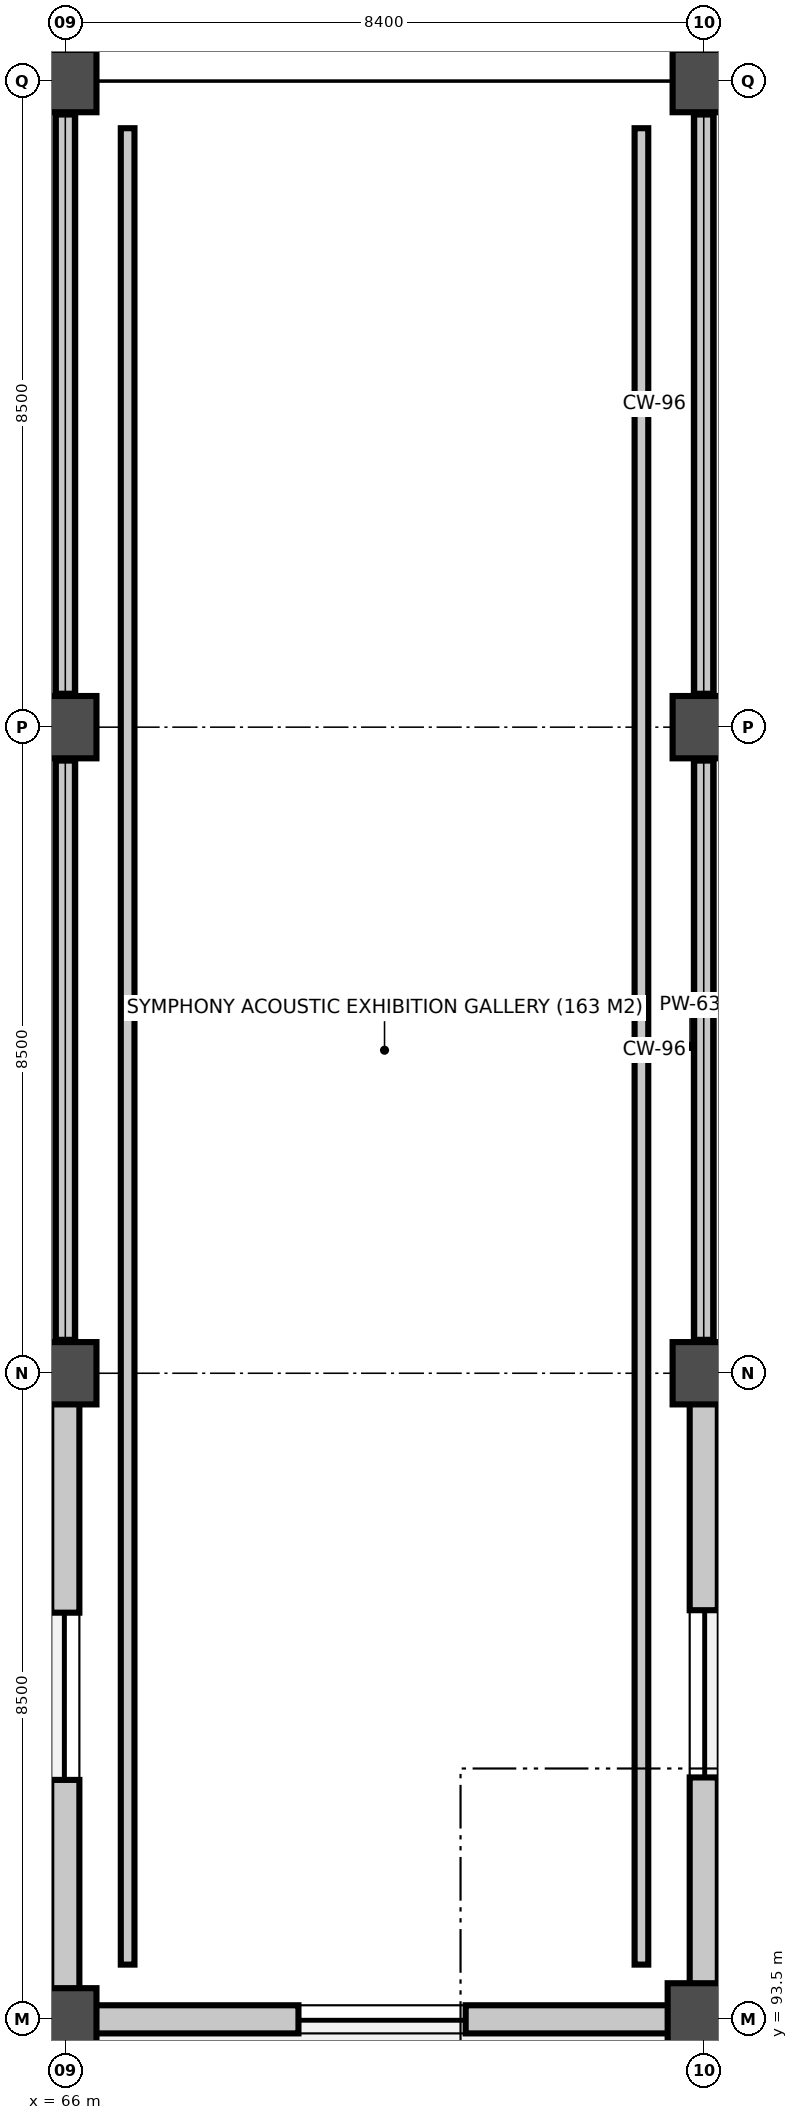
"""IFC4 building model, lengths in metres.
Left out: names, types, materials, properties, quantities, classifications, styles, units other than length and angle.
Written with IfcOpenShell. Run it as: python <this file> out.ifc"""

import sys

from ifc_helpers import new_model, si_unit, direction, frame, frame_2d, origin, origin_2d, place, context, subcontext, project, spatial, rectangle, extrude, element, fill, save


model = new_model("IFC4")
c1 = context("Model", 3, precision=1e-05, world=origin(), true_north=direction((0.0, 1.0)))
c2 = subcontext(c1, "Body", "Model", "MODEL_VIEW")
j1 = project(units=[si_unit("LENGTHUNIT", "METRE"), si_unit("PLANEANGLEUNIT", "RADIAN")], contexts=[c1])
p1 = place(None, origin())
s1 = spatial("IfcSite", under=j1, at=p1, CompositionType="ELEMENT")
p2 = place(p1, origin())
s2 = spatial("IfcBuilding", under=s1, at=p2, CompositionType="ELEMENT")
p3 = place(p2, origin())
s3 = spatial("IfcBuildingStorey", under=s2, at=p3, CompositionType="ELEMENT", Elevation=0.0)
for number, where, z_axis, x_axis in (
    (1, (66.0, 93.5, 0.0), (0.0, 0.0, 1.0), (1.0, 0.0, 0.0)),
    (2, (66.0, 102.0, 0.0), (0.0, 0.0, 1.0), (1.0, 0.0, 0.0)),
    (3, (66.0, 110.5, 0.0), (0.0, 0.0, 1.0), (1.0, 0.0, 0.0)),
    (4, (66.0, 119.0, 0.0), (0.0, 0.0, 1.0), (1.0, 0.0, 0.0)),
):
    element("IfcColumn", number, at=place(p3, frame(where, z_axis=z_axis, x_axis=x_axis)), inside=s3, PredefinedType="COLUMN", context=c2, shape_type="SweptSolid", body=[
        extrude(rectangle(XDim=0.82, YDim=0.82, at=origin_2d()), origin(), (0.0, 0.0, 1.0), 5.4),
    ])
p4 = place(p3, frame((74.4, 93.5, 0.0), z_axis=(0.0, 0.0, 1.0), x_axis=(1.0, 0.0, 0.0)))
e5 = element("IfcColumn", 5, at=p4, inside=s3, PredefinedType="COLUMN", context=c2, shape_type="SweptSolid", body=[
    extrude(rectangle(XDim=0.95, YDim=0.95, at=origin_2d()), origin(), (0.0, 0.0, 1.0), 5.4),
])
for number, where, z_axis, x_axis in (
    (6, (74.4, 102.0, 0.0), (0.0, 0.0, 1.0), (1.0, 0.0, 0.0)),
    (7, (74.4, 110.5, 0.0), (0.0, 0.0, 1.0), (1.0, 0.0, 0.0)),
    (8, (74.4, 119.0, 0.0), (0.0, 0.0, 1.0), (1.0, 0.0, 0.0)),
):
    element("IfcColumn", number, at=place(p3, frame(where, z_axis=z_axis, x_axis=x_axis)), inside=s3, PredefinedType="COLUMN", context=c2, shape_type="SweptSolid", body=[
        extrude(rectangle(XDim=0.82, YDim=0.82, at=origin_2d()), origin(), (0.0, 0.0, 1.0), 5.4),
    ])
p5 = place(p3, frame((73.945, 93.5, 0.0), z_axis=(0.0, 0.0, 1.0), x_axis=(-1.0, 0.0, 0.0)))
e9 = element("IfcWall", 9, at=p5, inside=s3, PredefinedType="SOLIDWALL", context=c2, shape_type="SweptSolid", body=[
    extrude(rectangle(XDim=7.555, YDim=0.37, at=frame_2d((3.778, 0.0))), origin(), (0.0, 0.0, 1.0), 4.098),
])
p6 = place(p5, frame((2.677, 0.0, 0.95)))
e10 = element("IfcOpeningElement", 10, at=p6, cuts=e9, PredefinedType="OPENING", context=c2, shape_type="SweptSolid", body=[
    extrude(rectangle(XDim=2.2, YDim=2.25, at=frame_2d((1.1, 1.125))), frame((0.0, 0.195, 0.0), z_axis=(0.0, -1.0, 0.0), x_axis=(1.0, 0.0, 0.0)), (0.0, 0.0, 1.0), 0.39),
])
p7 = place(p3, frame((66.0, 93.89, 0.0), z_axis=(0.0, 0.0, 1.0), x_axis=(0.0, 1.0, 0.0)))
e11 = element("IfcWall", 11, at=p7, inside=s3, PredefinedType="SOLIDWALL", context=c2, shape_type="SweptSolid", body=[
    extrude(rectangle(XDim=7.72, YDim=0.37, at=frame_2d((3.86, 0.0))), origin(), (0.0, 0.0, 1.0), 4.575),
])
p8 = place(p7, frame((2.76, 0.0, 0.95)))
e12 = element("IfcOpeningElement", 12, at=p8, cuts=e11, PredefinedType="OPENING", context=c2, shape_type="SweptSolid", body=[
    extrude(rectangle(XDim=2.2, YDim=2.25, at=frame_2d((1.1, 1.125))), frame((0.0, 0.195, 0.0), z_axis=(0.0, -1.0, 0.0), x_axis=(1.0, 0.0, 0.0)), (0.0, 0.0, 1.0), 0.39),
])
for number, where, z_axis, x_axis in (
    (13, (66.0, 102.43, 0.0), (0.0, 0.0, 1.0), (0.0, 1.0, 0.0)),
    (14, (66.0, 110.93, 0.0), (0.0, 0.0, 1.0), (0.0, 1.0, 0.0)),
):
    element("IfcWall", number, at=place(p3, frame(where, z_axis=z_axis, x_axis=x_axis)), inside=s3, PredefinedType="PARAPET", context=c2, shape_type="SweptSolid", body=[
        extrude(rectangle(XDim=7.64, YDim=0.26, at=frame_2d((3.82, 0.0))), origin(), (0.0, 0.0, 1.0), 1.12),
    ])
p9 = place(p3, frame((74.4, 101.61, 0.0), z_axis=(0.0, 0.0, 1.0), x_axis=(0.0, -1.0, 0.0)))
e15 = element("IfcWall", 15, at=p9, inside=s3, PredefinedType="SOLIDWALL", context=c2, shape_type="SweptSolid", body=[
    extrude(rectangle(XDim=7.655, YDim=0.37, at=frame_2d((3.828, 0.0))), origin(), (0.0, 0.0, 1.0), 4.431),
])
p10 = place(p9, frame((2.728, 0.0, 0.95)))
e16 = element("IfcOpeningElement", 16, at=p10, cuts=e15, PredefinedType="OPENING", context=c2, shape_type="SweptSolid", body=[
    extrude(rectangle(XDim=2.2, YDim=2.25, at=frame_2d((1.1, 1.125))), frame((0.0, 0.195, 0.0), z_axis=(0.0, -1.0, 0.0), x_axis=(1.0, 0.0, 0.0)), (0.0, 0.0, 1.0), 0.39),
])
for number, where, z_axis, x_axis in (
    (17, (74.4, 110.07, 0.0), (0.0, 0.0, 1.0), (0.0, -1.0, 0.0)),
    (18, (74.4, 118.57, 0.0), (0.0, 0.0, 1.0), (0.0, -1.0, 0.0)),
):
    element("IfcWall", number, at=place(p3, frame(where, z_axis=z_axis, x_axis=x_axis)), inside=s3, PredefinedType="PARAPET", context=c2, shape_type="SweptSolid", body=[
        extrude(rectangle(XDim=7.64, YDim=0.26, at=frame_2d((3.82, 0.0))), origin(), (0.0, 0.0, 1.0), 1.12),
    ])
for number, where, z_axis, x_axis in (
    (19, (73.58, 118.38, 0.0), (0.0, 0.0, 1.0), (0.0, -1.0, 0.0)),
    (20, (66.82, 94.22, 0.0), (0.0, 0.0, 1.0), (0.0, 1.0, 0.0)),
):
    element("IfcWall", number, at=place(p3, frame(where, z_axis=z_axis, x_axis=x_axis)), inside=s3, PredefinedType="PARTITIONING", context=c2, shape_type="SweptSolid", body=[
        extrude(rectangle(XDim=24.16, YDim=0.18, at=frame_2d((12.08, 0.0))), origin(), (0.0, 0.0, 1.0), 4.04),
    ])
p11 = place(p6, origin())
e21 = element("IfcWindow", 21, at=p11, inside=s3, PartitioningType="SINGLE_PANEL", PredefinedType="WINDOW", context=c2, shape_type="SweptSolid", body=[
    extrude(rectangle(XDim=2.2, YDim=2.25, at=frame_2d((1.1, 1.125))), frame((0.0, 0.03, 0.0), z_axis=(0.0, -1.0, 0.0), x_axis=(1.0, 0.0, 0.0)), (0.0, 0.0, 1.0), 0.06),
])
fill(e10, e21)
p12 = place(p8, origin())
e22 = element("IfcWindow", 22, at=p12, inside=s3, PartitioningType="SINGLE_PANEL", PredefinedType="WINDOW", context=c2, shape_type="SweptSolid", body=[
    extrude(rectangle(XDim=2.2, YDim=2.25, at=frame_2d((1.1, 1.125))), frame((0.0, 0.03, 0.0), z_axis=(0.0, -1.0, 0.0), x_axis=(1.0, 0.0, 0.0)), (0.0, 0.0, 1.0), 0.06),
])
fill(e12, e22)
p13 = place(p10, origin())
e23 = element("IfcWindow", 23, at=p13, inside=s3, PartitioningType="SINGLE_PANEL", PredefinedType="WINDOW", context=c2, shape_type="SweptSolid", body=[
    extrude(rectangle(XDim=2.2, YDim=2.25, at=frame_2d((1.1, 1.125))), frame((0.0, 0.03, 0.0), z_axis=(0.0, -1.0, 0.0), x_axis=(1.0, 0.0, 0.0)), (0.0, 0.0, 1.0), 0.06),
])
fill(e16, e23)
save(model, sys.argv[1])
